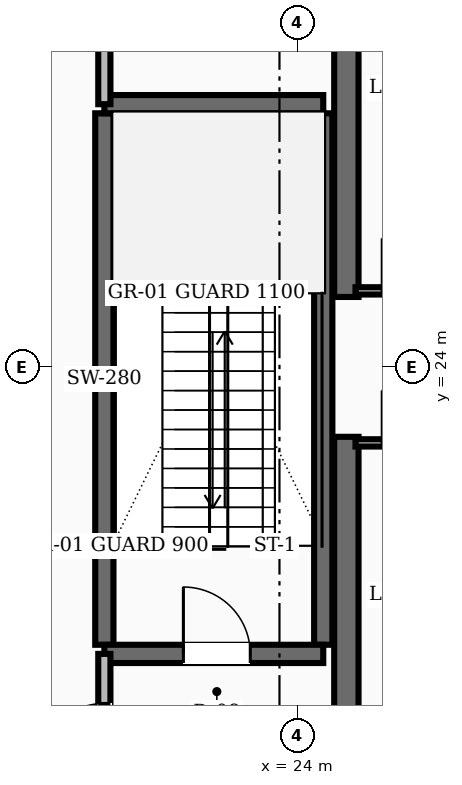
"""IFC4 building model, lengths in metres.
Left out: names, types, materials, properties, quantities, classifications, styles, units other than length and angle.
Written with IfcOpenShell. Run it as: python <this file> out.ifc"""

import sys

from ifc_helpers import new_model, si_unit, direction, frame, frame_2d, origin, place, context, subcontext, project, spatial, rectangle, extrude, element, fill, save


model = new_model("IFC4")
c1 = context("Model", 3, precision=1e-05, world=origin(), true_north=direction((0.0, 1.0)))
c2 = subcontext(c1, "Body", "Model", "MODEL_VIEW")
j1 = project(units=[si_unit("LENGTHUNIT", "METRE"), si_unit("PLANEANGLEUNIT", "RADIAN")], contexts=[c1])
p1 = place(None, origin())
s1 = spatial("IfcSite", under=j1, at=p1, CompositionType="ELEMENT")
p2 = place(p1, origin())
s2 = spatial("IfcBuilding", under=s1, at=p2, CompositionType="ELEMENT")
p3 = place(p2, frame((0.0, 0.0, 14.8)))
s3 = spatial("IfcBuildingStorey", under=s2, at=p3, CompositionType="ELEMENT", Elevation=14.8)
for number, where, z_axis, x_axis in (
    (1, (24.8, 16.55, 0.0), (0.0, 0.0, 1.0), (0.0, 1.0, 0.0)),
    (2, (24.8, 25.15, 0.0), (0.0, 0.0, 1.0), (0.0, 1.0, 0.0)),
):
    element("IfcWall", number, at=place(p3, frame(where, z_axis=z_axis, x_axis=x_axis)), inside=s3, PredefinedType="SHEAR", context=c2, shape_type="SweptSolid", body=[
        extrude(rectangle(XDim=6.3, YDim=0.4, at=frame_2d((3.15, 0.0))), origin(), (0.0, 0.0, 1.0), 4.8),
    ])
for number, where, z_axis, x_axis in (
    (3, (20.82, 19.43, 0.0), (0.0, 0.0, 1.0), (0.0, 1.0, 0.0)),
    (4, (24.42, 19.43, 0.0), (0.0, 0.0, 1.0), (0.0, 1.0, 0.0)),
):
    element("IfcWall", number, at=place(p3, frame(where, z_axis=z_axis, x_axis=x_axis)), inside=s3, PredefinedType="SHEAR", context=c2, shape_type="SweptSolid", body=[
        extrude(rectangle(XDim=8.74, YDim=0.3, at=frame_2d((4.37, 0.0))), origin(), (0.0, 0.0, 1.0), 4.8),
    ])
p4 = place(p3, frame((20.82, 19.28, 0.0), z_axis=(0.0, 0.0, 1.0), x_axis=(1.0, 0.0, 0.0)))
e5 = element("IfcWall", 5, at=p4, inside=s3, PredefinedType="SHEAR", context=c2, shape_type="SweptSolid", body=[
    extrude(rectangle(XDim=3.6, YDim=0.3, at=frame_2d((1.8, 0.0))), origin(), (0.0, 0.0, 1.0), 4.8),
])
p5 = place(p4, frame((1.3, 0.0, 0.0)))
e6 = element("IfcOpeningElement", 6, at=p5, cuts=e5, PredefinedType="OPENING", context=c2, shape_type="SweptSolid", body=[
    extrude(rectangle(XDim=1.1, YDim=2.1, at=frame_2d((0.55, 1.05))), frame((0.0, 0.16, 0.0), z_axis=(0.0, -1.0, 0.0), x_axis=(1.0, 0.0, 0.0)), (0.0, 0.0, 1.0), 0.32),
])
p6 = place(p3, frame((20.82, 28.32, 0.0), z_axis=(0.0, 0.0, 1.0), x_axis=(1.0, 0.0, 0.0)))
e7 = element("IfcWall", 7, at=p6, inside=s3, PredefinedType="SHEAR", context=c2, shape_type="SweptSolid", body=[
    extrude(rectangle(XDim=3.6, YDim=0.3, at=frame_2d((1.8, 0.0))), origin(), (0.0, 0.0, 1.0), 4.8),
])
p7 = place(p3, frame((20.82, 16.55, 0.0), z_axis=(0.0, 0.0, 1.0), x_axis=(0.0, 1.0, 0.0)))
e8 = element("IfcWall", 8, at=p7, inside=s3, PredefinedType="SOLIDWALL", context=c2, shape_type="SweptSolid", body=[
    extrude(rectangle(XDim=2.73, YDim=0.2, at=frame_2d((1.365, 0.0))), origin(), (0.0, 0.0, 1.0), 3.52),
])
p8 = place(p7, frame((0.815, 0.0, 0.0)))
e9 = element("IfcOpeningElement", 9, at=p8, cuts=e8, PredefinedType="OPENING", context=c2, shape_type="SweptSolid", body=[
    extrude(rectangle(XDim=1.1, YDim=2.1, at=frame_2d((0.55, 1.05))), frame((0.0, 0.11, 0.0), z_axis=(0.0, -1.0, 0.0), x_axis=(1.0, 0.0, 0.0)), (0.0, 0.0, 1.0), 0.22),
])
p9 = place(p3, frame((20.82, 28.32, 0.0), z_axis=(0.0, 0.0, 1.0), x_axis=(0.0, 1.0, 0.0)))
e10 = element("IfcWall", 10, at=p9, inside=s3, PredefinedType="SOLIDWALL", context=c2, shape_type="SweptSolid", body=[
    extrude(rectangle(XDim=3.13, YDim=0.2, at=frame_2d((1.565, 0.0))), origin(), (0.0, 0.0, 1.0), 3.52),
])
p10 = place(p9, frame((1.09, 0.0, 0.0)))
e11 = element("IfcOpeningElement", 11, at=p10, cuts=e10, PredefinedType="OPENING", context=c2, shape_type="SweptSolid", body=[
    extrude(rectangle(XDim=0.95, YDim=2.1, at=frame_2d((0.475, 1.05))), frame((0.0, 0.11, 0.0), z_axis=(0.0, -1.0, 0.0), x_axis=(1.0, 0.0, 0.0)), (0.0, 0.0, 1.0), 0.22),
])
p11 = place(p3, frame((24.95, 25.25, 0.0), z_axis=(0.0, 0.0, 1.0), x_axis=(1.0, 0.0, 0.0)))
e12 = element("IfcWall", 12, at=p11, inside=s3, PredefinedType="PARTITIONING", context=c2, shape_type="SweptSolid", body=[
    extrude(rectangle(XDim=3.2, YDim=0.12, at=frame_2d((1.6, 0.0))), origin(), (0.0, 0.0, 1.0), 3.52),
])
p12 = place(p11, frame((0.44, 0.0, 0.0)))
e13 = element("IfcOpeningElement", 13, at=p12, cuts=e12, PredefinedType="OPENING", context=c2, shape_type="SweptSolid", body=[
    extrude(rectangle(XDim=0.86, YDim=2.1, at=frame_2d((0.43, 1.05))), frame((0.0, 0.07, 0.0), z_axis=(0.0, -1.0, 0.0), x_axis=(1.0, 0.0, 0.0)), (0.0, 0.0, 1.0), 0.14),
])
p13 = place(p11, frame((1.9, 0.0, 0.0)))
e14 = element("IfcOpeningElement", 14, at=p13, cuts=e12, PredefinedType="OPENING", context=c2, shape_type="SweptSolid", body=[
    extrude(rectangle(XDim=0.86, YDim=2.1, at=frame_2d((0.43, 1.05))), frame((0.0, 0.07, 0.0), z_axis=(0.0, -1.0, 0.0), x_axis=(1.0, 0.0, 0.0)), (0.0, 0.0, 1.0), 0.14),
])
p14 = place(p3, frame((24.95, 22.75, 0.0), z_axis=(0.0, 0.0, 1.0), x_axis=(1.0, 0.0, 0.0)))
e15 = element("IfcWall", 15, at=p14, inside=s3, PredefinedType="PARTITIONING", context=c2, shape_type="SweptSolid", body=[
    extrude(rectangle(XDim=3.2, YDim=0.12, at=frame_2d((1.6, 0.0))), origin(), (0.0, 0.0, 1.0), 3.52),
])
p15 = place(p14, frame((0.44, 0.0, 0.0)))
e16 = element("IfcOpeningElement", 16, at=p15, cuts=e15, PredefinedType="OPENING", context=c2, shape_type="SweptSolid", body=[
    extrude(rectangle(XDim=0.86, YDim=2.1, at=frame_2d((0.43, 1.05))), frame((0.0, 0.07, 0.0), z_axis=(0.0, -1.0, 0.0), x_axis=(1.0, 0.0, 0.0)), (0.0, 0.0, 1.0), 0.14),
])
p16 = place(p14, frame((1.9, 0.0, 0.0)))
e17 = element("IfcOpeningElement", 17, at=p16, cuts=e15, PredefinedType="OPENING", context=c2, shape_type="SweptSolid", body=[
    extrude(rectangle(XDim=0.86, YDim=2.1, at=frame_2d((0.43, 1.05))), frame((0.0, 0.07, 0.0), z_axis=(0.0, -1.0, 0.0), x_axis=(1.0, 0.0, 0.0)), (0.0, 0.0, 1.0), 0.14),
])
p17 = place(p5, origin())
e18 = element("IfcDoor", 18, at=p17, inside=s3, OperationType="SINGLE_SWING_LEFT", PredefinedType="DOOR", context=c2, shape_type="SweptSolid", body=[
    extrude(rectangle(XDim=1.1, YDim=2.1, at=frame_2d((0.55, 1.05))), frame((0.0, 0.025, 0.0), z_axis=(0.0, -1.0, 0.0), x_axis=(1.0, 0.0, 0.0)), (0.0, 0.0, 1.0), 0.05),
])
fill(e6, e18)
p18 = place(p8, origin())
e19 = element("IfcDoor", 19, at=p18, inside=s3, OperationType="SINGLE_SWING_LEFT", PredefinedType="DOOR", context=c2, shape_type="SweptSolid", body=[
    extrude(rectangle(XDim=1.1, YDim=2.1, at=frame_2d((0.55, 1.05))), frame((0.0, 0.025, 0.0), z_axis=(0.0, -1.0, 0.0), x_axis=(1.0, 0.0, 0.0)), (0.0, 0.0, 1.0), 0.05),
])
fill(e9, e19)
p19 = place(p12, origin())
e20 = element("IfcDoor", 20, at=p19, inside=s3, OperationType="SINGLE_SWING_LEFT", PredefinedType="DOOR", context=c2, shape_type="SweptSolid", body=[
    extrude(rectangle(XDim=0.86, YDim=2.1, at=frame_2d((0.43, 1.05))), frame((0.0, 0.025, 0.0), z_axis=(0.0, -1.0, 0.0), x_axis=(1.0, 0.0, 0.0)), (0.0, 0.0, 1.0), 0.05),
])
fill(e13, e20)
p20 = place(p15, origin())
e21 = element("IfcDoor", 21, at=p20, inside=s3, OperationType="SINGLE_SWING_LEFT", PredefinedType="DOOR", context=c2, shape_type="SweptSolid", body=[
    extrude(rectangle(XDim=0.86, YDim=2.1, at=frame_2d((0.43, 1.05))), frame((0.0, 0.025, 0.0), z_axis=(0.0, -1.0, 0.0), x_axis=(1.0, 0.0, 0.0)), (0.0, 0.0, 1.0), 0.05),
])
fill(e16, e21)
save(model, sys.argv[1])
